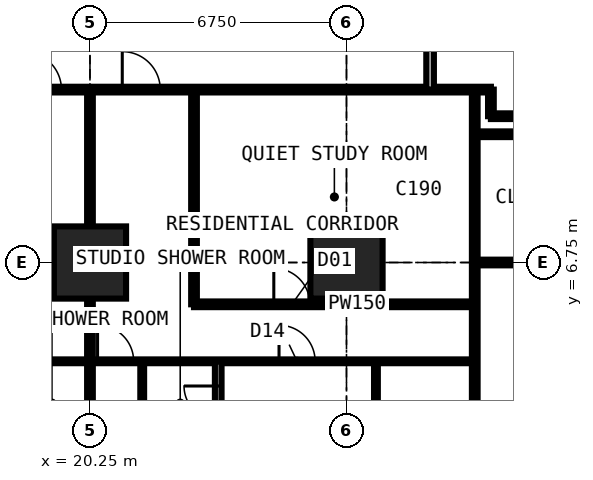
"""IFC4 building model, lengths in metres.
Left out: names, types, materials, properties, quantities, classifications, styles, units other than length and angle.
Written with IfcOpenShell. Run it as: python <this file> out.ifc"""

import sys

from ifc_helpers import new_model, si_unit, direction, frame, frame_2d, origin, origin_2d, place, context, subcontext, project, spatial, rectangle, extrude, element, fill, save


model = new_model("IFC4")
c1 = context("Model", 3, precision=1e-05, world=origin(), true_north=direction((0.0, 1.0)))
c2 = subcontext(c1, "Body", "Model", "MODEL_VIEW")
j1 = project(units=[si_unit("LENGTHUNIT", "METRE"), si_unit("PLANEANGLEUNIT", "RADIAN")], contexts=[c1])
p1 = place(None, origin())
s1 = spatial("IfcSite", under=j1, at=p1, CompositionType="ELEMENT")
p2 = place(p1, origin())
s2 = spatial("IfcBuilding", under=s1, at=p2, CompositionType="ELEMENT")
p3 = place(p2, frame((0.0, 0.0, 21.6)))
s3 = spatial("IfcBuildingStorey", under=s2, at=p3, CompositionType="ELEMENT", Elevation=21.6)
for number, where, z_axis, x_axis in (
    (1, (20.25, 6.75, 0.0), (0.0, 0.0, 1.0), (1.0, 0.0, 0.0)),
    (2, (27.0, 6.75, 0.0), (0.0, 0.0, 1.0), (1.0, 0.0, 0.0)),
):
    element("IfcColumn", number, at=place(p3, frame(where, z_axis=z_axis, x_axis=x_axis)), inside=s3, PredefinedType="COLUMN", context=c2, shape_type="SweptSolid", body=[
        extrude(rectangle(XDim=1.9, YDim=1.9, at=origin_2d()), origin(), (0.0, 0.0, 1.0), 3.6),
    ])
p4 = place(p3, frame((6.75, 4.15, 0.0), z_axis=(0.0, 0.0, 1.0), x_axis=(1.0, 0.0, 0.0)))
e3 = element("IfcWall", 3, at=p4, inside=s3, PredefinedType="PARTITIONING", context=c2, shape_type="SweptSolid", body=[
    extrude(rectangle(XDim=23.625, YDim=0.1, at=frame_2d((11.812, 0.0))), origin(), (0.0, 0.0, 1.0), 3.375),
])
p5 = place(p4, frame((0.2, 0.0, 0.0)))
e4 = element("IfcOpeningElement", 4, at=p5, cuts=e3, PredefinedType="OPENING", context=c2, shape_type="SweptSolid", body=[
    extrude(rectangle(XDim=0.95, YDim=2.2, at=frame_2d((0.475, 1.1))), frame((0.0, 0.06, 0.0), z_axis=(0.0, -1.0, 0.0), x_axis=(1.0, 0.0, 0.0)), (0.0, 0.0, 1.0), 0.12),
])
p6 = place(p4, frame((3.625, 0.0, 0.0)))
e5 = element("IfcOpeningElement", 5, at=p6, cuts=e3, PredefinedType="OPENING", context=c2, shape_type="SweptSolid", body=[
    extrude(rectangle(XDim=0.95, YDim=2.2, at=frame_2d((0.475, 1.1))), frame((0.0, 0.06, 0.0), z_axis=(0.0, -1.0, 0.0), x_axis=(1.0, 0.0, 0.0)), (0.0, 0.0, 1.0), 0.12),
])
p7 = place(p4, frame((7.0, 0.0, 0.0)))
e6 = element("IfcOpeningElement", 6, at=p7, cuts=e3, PredefinedType="OPENING", context=c2, shape_type="SweptSolid", body=[
    extrude(rectangle(XDim=0.95, YDim=2.2, at=frame_2d((0.475, 1.1))), frame((0.0, 0.06, 0.0), z_axis=(0.0, -1.0, 0.0), x_axis=(1.0, 0.0, 0.0)), (0.0, 0.0, 1.0), 0.12),
])
p8 = place(p4, frame((10.375, 0.0, 0.0)))
e7 = element("IfcOpeningElement", 7, at=p8, cuts=e3, PredefinedType="OPENING", context=c2, shape_type="SweptSolid", body=[
    extrude(rectangle(XDim=0.95, YDim=2.2, at=frame_2d((0.475, 1.1))), frame((0.0, 0.06, 0.0), z_axis=(0.0, -1.0, 0.0), x_axis=(1.0, 0.0, 0.0)), (0.0, 0.0, 1.0), 0.12),
])
p9 = place(p4, frame((18.475, 0.0, 0.0)))
e8 = element("IfcOpeningElement", 8, at=p9, cuts=e3, PredefinedType="OPENING", context=c2, shape_type="SweptSolid", body=[
    extrude(rectangle(XDim=0.95, YDim=2.2, at=frame_2d((0.475, 1.1))), frame((0.0, 0.06, 0.0), z_axis=(0.0, -1.0, 0.0), x_axis=(1.0, 0.0, 0.0)), (0.0, 0.0, 1.0), 0.12),
])
p10 = place(p4, frame((13.7, 0.0, 0.0)))
e9 = element("IfcOpeningElement", 9, at=p10, cuts=e3, PredefinedType="OPENING", context=c2, shape_type="SweptSolid", body=[
    extrude(rectangle(XDim=0.95, YDim=2.2, at=frame_2d((0.475, 1.1))), frame((0.0, 0.06, 0.0), z_axis=(0.0, -1.0, 0.0), x_axis=(1.0, 0.0, 0.0)), (0.0, 0.0, 1.0), 0.12),
])
p11 = place(p3, frame((10.125, 11.3, 0.0), z_axis=(0.0, 0.0, 1.0), x_axis=(1.0, 0.0, 0.0)))
e10 = element("IfcWall", 10, at=p11, inside=s3, PredefinedType="PARTITIONING", context=c2, shape_type="SweptSolid", body=[
    extrude(rectangle(XDim=20.675, YDim=0.15, at=frame_2d((10.337, 0.0))), origin(), (0.0, 0.0, 1.0), 3.375),
])
p12 = place(p11, frame((8.375, 0.0, 0.0)))
e11 = element("IfcOpeningElement", 11, at=p12, cuts=e10, PredefinedType="OPENING", context=c2, shape_type="SweptSolid", body=[
    extrude(rectangle(XDim=1.0, YDim=2.2, at=frame_2d((0.5, 1.1))), frame((0.0, 0.085, 0.0), z_axis=(0.0, -1.0, 0.0), x_axis=(1.0, 0.0, 0.0)), (0.0, 0.0, 1.0), 0.17),
])
p13 = place(p11, frame((10.975, 0.0, 0.0)))
e12 = element("IfcOpeningElement", 12, at=p13, cuts=e10, PredefinedType="OPENING", context=c2, shape_type="SweptSolid", body=[
    extrude(rectangle(XDim=1.0, YDim=2.2, at=frame_2d((0.5, 1.1))), frame((0.0, 0.085, 0.0), z_axis=(0.0, -1.0, 0.0), x_axis=(1.0, 0.0, 0.0)), (0.0, 0.0, 1.0), 0.17),
])
p14 = place(p11, frame((3.925, 0.0, 0.0)))
e13 = element("IfcOpeningElement", 13, at=p14, cuts=e10, PredefinedType="OPENING", context=c2, shape_type="SweptSolid", body=[
    extrude(rectangle(XDim=0.95, YDim=2.2, at=frame_2d((0.475, 1.1))), frame((0.0, 0.085, 0.0), z_axis=(0.0, -1.0, 0.0), x_axis=(1.0, 0.0, 0.0)), (0.0, 0.0, 1.0), 0.17),
])
p15 = place(p3, frame((20.25, -0.734, 0.0), z_axis=(0.0, 0.0, 1.0), x_axis=(0.0, 1.0, 0.0)))
e14 = element("IfcWall", 14, at=p15, inside=s3, PredefinedType="PARTITIONING", context=c2, shape_type="SweptSolid", body=[
    extrude(rectangle(XDim=12.034, YDim=0.15, at=frame_2d((6.017, 0.0))), origin(), (0.0, 0.0, 1.0), 2.61),
])
p16 = place(p3, frame((21.625, 1.95, 0.0), z_axis=(0.0, 0.0, 1.0), x_axis=(0.0, 1.0, 0.0)))
e15 = element("IfcWall", 15, at=p16, inside=s3, PredefinedType="PARTITIONING", context=c2, shape_type="SweptSolid", body=[
    extrude(rectangle(XDim=2.2, YDim=0.1, at=frame_2d((1.1, 0.0))), origin(), (0.0, 0.0, 1.0), 3.375),
])
p17 = place(p3, frame((22.988, 5.65, 0.0), z_axis=(0.0, 0.0, 1.0), x_axis=(1.0, 0.0, 0.0)))
e16 = element("IfcWall", 16, at=p17, inside=s3, PredefinedType="PARTITIONING", context=c2, shape_type="SweptSolid", body=[
    extrude(rectangle(XDim=7.387, YDim=0.15, at=frame_2d((3.694, 0.0))), origin(), (0.0, 0.0, 1.0), 3.375),
])
p18 = place(p17, frame((2.1, 0.0, 0.0)))
e17 = element("IfcOpeningElement", 17, at=p18, cuts=e16, PredefinedType="OPENING", context=c2, shape_type="SweptSolid", body=[
    extrude(rectangle(XDim=0.95, YDim=2.2, at=frame_2d((0.475, 1.1))), frame((0.0, 0.085, 0.0), z_axis=(0.0, -1.0, 0.0), x_axis=(1.0, 0.0, 0.0)), (0.0, 0.0, 1.0), 0.17),
])
p19 = place(p3, frame((22.988, 5.65, 0.0), z_axis=(0.0, 0.0, 1.0), x_axis=(0.0, 1.0, 0.0)))
e18 = element("IfcWall", 18, at=p19, inside=s3, PredefinedType="PARTITIONING", context=c2, shape_type="SweptSolid", body=[
    extrude(rectangle(XDim=5.65, YDim=0.15, at=frame_2d((2.825, 0.0))), origin(), (0.0, 0.0, 1.0), 3.375),
])
p20 = place(p3, frame((23.625, -0.734, 0.0), z_axis=(0.0, 0.0, 1.0), x_axis=(0.0, 1.0, 0.0)))
e19 = element("IfcWall", 19, at=p20, inside=s3, PredefinedType="PARTITIONING", context=c2, shape_type="SweptSolid", body=[
    extrude(rectangle(XDim=4.884, YDim=0.175, at=frame_2d((2.442, 0.0))), origin(), (0.0, 0.0, 1.0), 3.375),
])
p21 = place(p20, frame((3.334, 0.0, 0.0)))
e20 = element("IfcOpeningElement", 20, at=p21, cuts=e19, PredefinedType="OPENING", context=c2, shape_type="SweptSolid", body=[
    extrude(rectangle(XDim=0.9, YDim=2.2, at=frame_2d((0.45, 1.1))), frame((0.0, 0.097, 0.0), z_axis=(0.0, -1.0, 0.0), x_axis=(1.0, 0.0, 0.0)), (0.0, 0.0, 1.0), 0.195),
])
p22 = place(p3, frame((27.775, 1.75, 0.0), z_axis=(0.0, 0.0, 1.0), x_axis=(0.0, 1.0, 0.0)))
e21 = element("IfcWall", 21, at=p22, inside=s3, PredefinedType="PARTITIONING", context=c2, shape_type="SweptSolid", body=[
    extrude(rectangle(XDim=2.4, YDim=0.1, at=frame_2d((1.2, 0.0))), origin(), (0.0, 0.0, 1.0), 3.375),
])
p23 = place(p3, frame((29.2, 11.3, 0.0), z_axis=(0.0, 0.0, 1.0), x_axis=(0.0, 1.0, 0.0)))
e22 = element("IfcWall", 22, at=p23, inside=s3, PredefinedType="PARTITIONING", context=c2, shape_type="SweptSolid", body=[
    extrude(rectangle(XDim=17.9, YDim=0.2, at=frame_2d((8.95, 0.0))), origin(), (0.0, 0.0, 1.0), 3.375),
])
p24 = place(p23, frame((8.35, 0.0, 0.0)))
e23 = element("IfcOpeningElement", 23, at=p24, cuts=e22, PredefinedType="OPENING", context=c2, shape_type="SweptSolid", body=[
    extrude(rectangle(XDim=1.2, YDim=2.2, at=frame_2d((0.6, 1.1))), frame((0.0, 0.11, 0.0), z_axis=(0.0, -1.0, 0.0), x_axis=(1.0, 0.0, 0.0)), (0.0, 0.0, 1.0), 0.22),
])
p25 = place(p3, frame((30.375, -0.734, 0.0), z_axis=(0.0, 0.0, 1.0), x_axis=(0.0, 1.0, 0.0)))
e24 = element("IfcWall", 24, at=p25, inside=s3, PredefinedType="PARTITIONING", context=c2, shape_type="SweptSolid", body=[
    extrude(rectangle(XDim=12.034, YDim=0.15, at=frame_2d((6.017, 0.0))), origin(), (0.0, 0.0, 1.0), 3.375),
])
p26 = place(p3, frame((30.375, 6.75, 0.0), z_axis=(0.0, 0.0, 1.0), x_axis=(1.0, 0.0, 0.0)))
e25 = element("IfcWall", 25, at=p26, inside=s3, PredefinedType="PARTITIONING", context=c2, shape_type="SweptSolid", body=[
    extrude(rectangle(XDim=10.859, YDim=0.15, at=frame_2d((5.429, 0.0))), origin(), (0.0, 0.0, 1.0), 2.877),
])
p27 = place(p26, frame((1.4, 0.0, 0.0)))
e26 = element("IfcOpeningElement", 26, at=p27, cuts=e25, PredefinedType="OPENING", context=c2, shape_type="SweptSolid", body=[
    extrude(rectangle(XDim=1.0, YDim=2.2, at=frame_2d((0.5, 1.1))), frame((0.0, 0.085, 0.0), z_axis=(0.0, -1.0, 0.0), x_axis=(1.0, 0.0, 0.0)), (0.0, 0.0, 1.0), 0.17),
])
p28 = place(p3, frame((30.375, 10.125, 0.0), z_axis=(0.0, 0.0, 1.0), x_axis=(1.0, 0.0, 0.0)))
e27 = element("IfcWall", 27, at=p28, inside=s3, PredefinedType="PARTITIONING", context=c2, shape_type="SweptSolid", body=[
    extrude(rectangle(XDim=10.859, YDim=0.15, at=frame_2d((5.429, 0.0))), origin(), (0.0, 0.0, 1.0), 3.375),
])
p29 = place(p28, frame((2.5, 0.0, 0.0)))
e28 = element("IfcOpeningElement", 28, at=p29, cuts=e27, PredefinedType="OPENING", context=c2, shape_type="SweptSolid", body=[
    extrude(rectangle(XDim=1.0, YDim=2.2, at=frame_2d((0.5, 1.1))), frame((0.0, 0.085, 0.0), z_axis=(0.0, -1.0, 0.0), x_axis=(1.0, 0.0, 0.0)), (0.0, 0.0, 1.0), 0.17),
])
p30 = place(p3, frame((30.8, 10.6, 0.0), z_axis=(0.0, 0.0, 1.0), x_axis=(0.0, 1.0, 0.0)))
e29 = element("IfcWall", 29, at=p30, inside=s3, PredefinedType="PARTITIONING", context=c2, shape_type="SweptSolid", body=[
    extrude(rectangle(XDim=0.7, YDim=0.15, at=frame_2d((0.35, 0.0))), origin(), (0.0, 0.0, 1.0), 3.375),
])
p31 = place(p3, frame((30.8, 10.6, 0.0), z_axis=(0.0, 0.0, 1.0), x_axis=(1.0, 0.0, 0.0)))
e30 = element("IfcWall", 30, at=p31, inside=s3, PredefinedType="PARTITIONING", context=c2, shape_type="SweptSolid", body=[
    extrude(rectangle(XDim=1.85, YDim=0.15, at=frame_2d((0.925, 0.0))), origin(), (0.0, 0.0, 1.0), 3.375),
])
p32 = place(p12, origin())
e31 = element("IfcDoor", 31, at=p32, inside=s3, OperationType="SINGLE_SWING_LEFT", PredefinedType="DOOR", context=c2, shape_type="SweptSolid", body=[
    extrude(rectangle(XDim=1.0, YDim=2.2, at=frame_2d((0.5, 1.1))), frame((0.0, 0.025, 0.0), z_axis=(0.0, -1.0, 0.0), x_axis=(1.0, 0.0, 0.0)), (0.0, 0.0, 1.0), 0.05),
])
fill(e11, e31)
p33 = place(p9, origin())
e32 = element("IfcDoor", 32, at=p33, inside=s3, OperationType="SINGLE_SWING_LEFT", PredefinedType="DOOR", context=c2, shape_type="SweptSolid", body=[
    extrude(rectangle(XDim=0.95, YDim=2.2, at=frame_2d((0.475, 1.1))), frame((0.0, 0.025, 0.0), z_axis=(0.0, -1.0, 0.0), x_axis=(1.0, 0.0, 0.0)), (0.0, 0.0, 1.0), 0.05),
])
fill(e8, e32)
p34 = place(p10, origin())
e33 = element("IfcDoor", 33, at=p34, inside=s3, OperationType="SINGLE_SWING_LEFT", PredefinedType="DOOR", context=c2, shape_type="SweptSolid", body=[
    extrude(rectangle(XDim=0.95, YDim=2.2, at=frame_2d((0.475, 1.1))), frame((0.0, 0.025, 0.0), z_axis=(0.0, -1.0, 0.0), x_axis=(1.0, 0.0, 0.0)), (0.0, 0.0, 1.0), 0.05),
])
fill(e9, e33)
p35 = place(p21, origin())
e34 = element("IfcDoor", 34, at=p35, inside=s3, OperationType="SINGLE_SWING_RIGHT", PredefinedType="DOOR", context=c2, shape_type="SweptSolid", body=[
    extrude(rectangle(XDim=0.9, YDim=2.2, at=frame_2d((0.45, 1.1))), frame((0.0, 0.025, 0.0), z_axis=(0.0, -1.0, 0.0), x_axis=(1.0, 0.0, 0.0)), (0.0, 0.0, 1.0), 0.05),
])
fill(e20, e34)
p36 = place(p13, origin())
e35 = element("IfcDoor", 35, at=p36, inside=s3, OperationType="SINGLE_SWING_LEFT", PredefinedType="DOOR", context=c2, shape_type="SweptSolid", body=[
    extrude(rectangle(XDim=1.0, YDim=2.2, at=frame_2d((0.5, 1.1))), frame((0.0, 0.025, 0.0), z_axis=(0.0, -1.0, 0.0), x_axis=(1.0, 0.0, 0.0)), (0.0, 0.0, 1.0), 0.05),
])
fill(e12, e35)
p37 = place(p18, origin())
e36 = element("IfcDoor", 36, at=p37, inside=s3, OperationType="SINGLE_SWING_LEFT", PredefinedType="DOOR", context=c2, shape_type="SweptSolid", body=[
    extrude(rectangle(XDim=0.95, YDim=2.2, at=frame_2d((0.475, 1.1))), frame((0.0, 0.025, 0.0), z_axis=(0.0, -1.0, 0.0), x_axis=(1.0, 0.0, 0.0)), (0.0, 0.0, 1.0), 0.05),
])
fill(e17, e36)
save(model, sys.argv[1])
